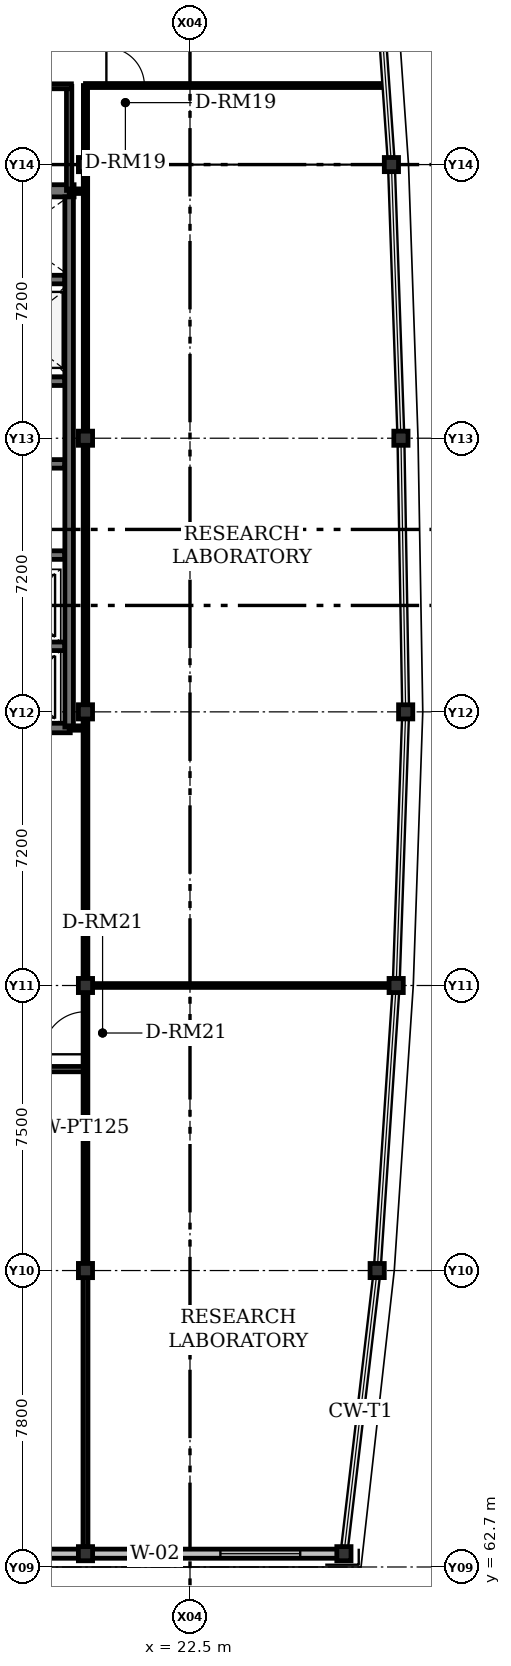
"""IFC4 building model, lengths in metres.
Left out: names, types, materials, properties, quantities, classifications, styles, units other than length and angle.
Written with IfcOpenShell. Run it as: python <this file> out.ifc"""

import sys

from ifc_helpers import new_model, si_unit, direction, frame, frame_2d, origin, origin_2d, place, context, subcontext, project, spatial, rectangle, i_section, extrude, element, fill, save


model = new_model("IFC4")
c1 = context("Model", 3, precision=1e-05, world=origin(), true_north=direction((0.0, 1.0)))
c2 = subcontext(c1, "Body", "Model", "MODEL_VIEW")
j1 = project(units=[si_unit("LENGTHUNIT", "METRE"), si_unit("PLANEANGLEUNIT", "RADIAN")], contexts=[c1])
p1 = place(None, origin())
s1 = spatial("IfcSite", under=j1, at=p1, CompositionType="ELEMENT")
p2 = place(p1, origin())
s2 = spatial("IfcBuilding", under=s1, at=p2, CompositionType="ELEMENT")
p3 = place(p2, frame((0.0, 0.0, 22.5)))
s3 = spatial("IfcBuildingStorey", under=s2, at=p3, CompositionType="ELEMENT", Elevation=22.5)
for number, where, z_axis, x_axis in (
    (1, (19.75, 63.05, 0.0), (0.0, 0.0, 1.0), (1.0, 0.0, 0.0)),
    (2, (26.55, 63.05, 0.0), (0.0, 0.0, 1.0), (1.0, 0.0, 0.0)),
    (3, (19.75, 70.5, 0.0), (0.0, 0.0, 1.0), (0.0, 1.0, 0.0)),
    (4, (27.425, 70.5, 0.0), (0.0, 0.0, 1.0), (1.0, 0.0, 0.0)),
    (5, (19.75, 78.0, 0.0), (0.0, 0.0, 1.0), (1.0, 0.0, 0.0)),
    (6, (27.925, 78.0, 0.0), (0.0, 0.0, 1.0), (1.0, 0.0, 0.0)),
    (7, (19.75, 85.2, 0.0), (0.0, 0.0, 1.0), (0.0, 1.0, 0.0)),
    (8, (28.175, 85.2, 0.0), (0.0, 0.0, 1.0), (1.0, 0.0, 0.0)),
    (9, (19.75, 92.4, 0.0), (0.0, 0.0, 1.0), (1.0, 0.0, 0.0)),
    (10, (28.05, 92.4, 0.0), (0.0, 0.0, 1.0), (1.0, 0.0, 0.0)),
    (11, (19.75, 99.6, 0.0), (0.0, 0.0, 1.0), (0.0, 1.0, 0.0)),
    (12, (27.8, 99.6, 0.0), (0.0, 0.0, 1.0), (1.0, 0.0, 0.0)),
):
    element("IfcColumn", number, at=place(p3, frame(where, z_axis=z_axis, x_axis=x_axis)), inside=s3, PredefinedType="COLUMN", context=c2, shape_type="SweptSolid", body=[
        extrude(i_section(OverallWidth=0.374, OverallDepth=0.372, WebThickness=0.016, FlangeThickness=0.026, FilletRadius=0.015, at=origin_2d()), origin(), (0.0, 0.0, 1.0), 4.2),
    ])
p4 = place(p3, frame((19.75, 63.05, 0.0), z_axis=(0.0, 0.0, 1.0), x_axis=(-1.0, 0.0, 0.0)))
e13 = element("IfcWall", 13, at=p4, inside=s3, PredefinedType="SOLIDWALL", context=c2, shape_type="SweptSolid", body=[
    extrude(rectangle(XDim=11.9, YDim=0.24, at=frame_2d((5.95, 0.0))), origin(), (0.0, 0.0, 1.0), 3.557),
])
p5 = place(p4, frame((1.15, 0.0, 0.92)))
e14 = element("IfcOpeningElement", 14, at=p5, cuts=e13, PredefinedType="OPENING", context=c2, shape_type="SweptSolid", body=[
    extrude(rectangle(XDim=2.4, YDim=1.55, at=frame_2d((1.2, 0.775))), frame((0.0, 0.12, 0.0), z_axis=(0.0, -1.0, 0.0), x_axis=(1.0, 0.0, 0.0)), (0.0, 0.0, 1.0), 0.24),
])
p6 = place(p4, frame((9.7, 0.0, 0.92)))
e15 = element("IfcOpeningElement", 15, at=p6, cuts=e13, PredefinedType="OPENING", context=c2, shape_type="SweptSolid", body=[
    extrude(rectangle(XDim=1.05, YDim=1.3, at=frame_2d((0.525, 0.65))), frame((0.0, 0.12, 0.0), z_axis=(0.0, -1.0, 0.0), x_axis=(1.0, 0.0, 0.0)), (0.0, 0.0, 1.0), 0.24),
])
p7 = place(p3, frame((26.55, 63.05, 0.0), z_axis=(0.0, 0.0, 1.0), x_axis=(-1.0, 0.0, 0.0)))
e16 = element("IfcWall", 16, at=p7, inside=s3, PredefinedType="SOLIDWALL", context=c2, shape_type="SweptSolid", body=[
    extrude(rectangle(XDim=6.8, YDim=0.24, at=frame_2d((3.4, 0.0))), origin(), (0.0, 0.0, 1.0), 3.557),
])
p8 = place(p7, frame((1.15, 0.0, 0.92)))
e17 = element("IfcOpeningElement", 17, at=p8, cuts=e16, PredefinedType="OPENING", context=c2, shape_type="SweptSolid", body=[
    extrude(rectangle(XDim=2.1, YDim=1.7, at=frame_2d((1.05, 0.85))), frame((0.0, 0.12, 0.0), z_axis=(0.0, -1.0, 0.0), x_axis=(1.0, 0.0, 0.0)), (0.0, 0.0, 1.0), 0.24),
])
p9 = place(p7, frame((4.3, 0.0, 0.92)))
e18 = element("IfcOpeningElement", 18, at=p9, cuts=e16, PredefinedType="OPENING", context=c2, shape_type="SweptSolid", body=[
    extrude(rectangle(XDim=1.35, YDim=1.4, at=frame_2d((0.675, 0.7))), frame((0.0, 0.12, 0.0), z_axis=(0.0, -1.0, 0.0), x_axis=(1.0, 0.0, 0.0)), (0.0, 0.0, 1.0), 0.24),
])
p10 = place(p3, frame((16.15, 98.91, 0.0), z_axis=(0.0, 0.0, 1.0), x_axis=(1.0, 0.0, 0.0)))
e19 = element("IfcWall", 19, at=p10, inside=s3, PredefinedType="SHEAR", context=c2, shape_type="SweptSolid", body=[
    extrude(rectangle(XDim=3.3, YDim=0.32, at=frame_2d((1.65, 0.0))), origin(), (0.0, 0.0, 1.0), 4.2),
])
p11 = place(p3, frame((16.4, 84.775, 0.0), z_axis=(0.0, 0.0, 1.0), x_axis=(1.0, 0.0, 0.0)))
e20 = element("IfcWall", 20, at=p11, inside=s3, PredefinedType="SHEAR", context=c2, shape_type="SweptSolid", body=[
    extrude(rectangle(XDim=2.95, YDim=0.25, at=frame_2d((1.475, 0.0))), origin(), (0.0, 0.0, 1.0), 4.2),
])
p12 = place(p3, frame((19.32, 84.8, 0.0), z_axis=(0.0, 0.0, 1.0), x_axis=(0.0, 1.0, 0.0)))
e21 = element("IfcWall", 21, at=p12, inside=s3, PredefinedType="SHEAR", context=c2, shape_type="SweptSolid", body=[
    extrude(rectangle(XDim=13.95, YDim=0.225, at=frame_2d((6.975, 0.0))), origin(), (0.0, 0.0, 1.0), 4.2),
])
for number, where, z_axis, x_axis in (
    (22, (16.4, 86.925, 0.0), (0.0, 0.0, 1.0), (1.0, 0.0, 0.0)),
    (23, (16.4, 89.325, 0.0), (0.0, 0.0, 1.0), (1.0, 0.0, 0.0)),
    (24, (16.4, 91.725, 0.0), (0.0, 0.0, 1.0), (1.0, 0.0, 0.0)),
    (25, (16.4, 93.9, 0.0), (0.0, 0.0, 1.0), (1.0, 0.0, 0.0)),
    (26, (16.4, 96.575, 0.0), (0.0, 0.0, 1.0), (1.0, 0.0, 0.0)),
):
    element("IfcWall", number, at=place(p3, frame(where, z_axis=z_axis, x_axis=x_axis)), inside=s3, PredefinedType="SHEAR", context=c2, shape_type="SweptSolid", body=[
        extrude(rectangle(XDim=2.8, YDim=0.225, at=frame_2d((1.4, 0.0))), origin(), (0.0, 0.0, 1.0), 4.2),
    ])
p13 = place(p3, frame((19.32, 98.92, 0.0), z_axis=(0.0, 0.0, 1.0), x_axis=(0.0, 1.0, 0.0)))
e27 = element("IfcWall", 27, at=p13, inside=s3, PredefinedType="PARTITIONING", context=c2, shape_type="SweptSolid", body=[
    extrude(rectangle(XDim=2.74, YDim=0.14, at=frame_2d((1.37, 0.0))), origin(), (0.0, 0.0, 1.0), 3.277),
])
p14 = place(p3, frame((19.38, 101.66, 0.0), z_axis=(0.0, 0.0, 1.0), x_axis=(-1.0, 0.0, 0.0)))
e28 = element("IfcWall", 28, at=p14, inside=s3, PredefinedType="PARTITIONING", context=c2, shape_type="SweptSolid", body=[
    extrude(rectangle(XDim=3.16, YDim=0.13, at=frame_2d((1.58, 0.0))), origin(), (0.0, 0.0, 1.0), 3.95),
])
p15 = place(p3, frame((19.75, 98.9, 0.0), z_axis=(0.0, 0.0, 1.0), x_axis=(-1.0, 0.0, 0.0)))
e29 = element("IfcWall", 29, at=p15, inside=s3, PredefinedType="PARTITIONING", context=c2, shape_type="SweptSolid", body=[
    extrude(rectangle(XDim=0.43, YDim=0.12, at=frame_2d((0.215, 0.0))), origin(), (0.0, 0.0, 1.0), 3.507),
])
p16 = place(p3, frame((19.32, 84.775, 0.0), z_axis=(0.0, 0.0, 1.0), x_axis=(1.0, 0.0, 0.0)))
e30 = element("IfcWall", 30, at=p16, inside=s3, PredefinedType="PARTITIONING", context=c2, shape_type="SweptSolid", body=[
    extrude(rectangle(XDim=0.43, YDim=0.115, at=frame_2d((0.215, 0.0))), origin(), (0.0, 0.0, 1.0), 3.507),
])
p17 = place(p3, frame((19.75, 78.181, 0.0), z_axis=(0.0, 0.0, 1.0), x_axis=(0.0, 1.0, 0.0)))
e31 = element("IfcWall", 31, at=p17, inside=s3, PredefinedType="PARTITIONING", context=c2, shape_type="SweptSolid", body=[
    extrude(rectangle(XDim=6.837, YDim=0.125, at=frame_2d((3.418, 0.0))), origin(), (0.0, 0.0, 1.0), 3.507),
])
p18 = place(p3, frame((19.75, 85.382, 0.0), z_axis=(0.0, 0.0, 1.0), x_axis=(0.0, 1.0, 0.0)))
e32 = element("IfcWall", 32, at=p18, inside=s3, PredefinedType="PARTITIONING", context=c2, shape_type="SweptSolid", body=[
    extrude(rectangle(XDim=6.837, YDim=0.12, at=frame_2d((3.418, 0.0))), origin(), (0.0, 0.0, 1.0), 3.507),
])
p19 = place(p3, frame((19.75, 92.581, 0.0), z_axis=(0.0, 0.0, 1.0), x_axis=(0.0, 1.0, 0.0)))
e33 = element("IfcWall", 33, at=p19, inside=s3, PredefinedType="PARTITIONING", context=c2, shape_type="SweptSolid", body=[
    extrude(rectangle(XDim=6.837, YDim=0.115, at=frame_2d((3.418, 0.0))), origin(), (0.0, 0.0, 1.0), 3.507),
])
p20 = place(p3, frame((19.75, 99.782, 0.0), z_axis=(0.0, 0.0, 1.0), x_axis=(0.0, 1.0, 0.0)))
e34 = element("IfcWall", 34, at=p20, inside=s3, PredefinedType="PARTITIONING", context=c2, shape_type="SweptSolid", body=[
    extrude(rectangle(XDim=1.898, YDim=0.11, at=frame_2d((0.949, 0.0))), origin(), (0.0, 0.0, 1.0), 3.507),
])
p21 = place(p3, frame((19.75, 101.68, 0.0), z_axis=(0.0, 0.0, 1.0), x_axis=(1.0, 0.0, 0.0)))
e35 = element("IfcWall", 35, at=p21, inside=s3, PredefinedType="PARTITIONING", context=c2, shape_type="SweptSolid", body=[
    extrude(rectangle(XDim=7.915, YDim=0.105, at=frame_2d((3.958, 0.0))), origin(), (0.0, 0.0, 1.0), 3.507),
])
p22 = place(p21, frame((0.55, 0.0, 0.0)))
e36 = element("IfcOpeningElement", 36, at=p22, cuts=e35, PredefinedType="OPENING", context=c2, shape_type="SweptSolid", body=[
    extrude(rectangle(XDim=1.0, YDim=2.25, at=frame_2d((0.5, 1.125))), frame((0.0, 0.052, 0.0), z_axis=(0.0, -1.0, 0.0), x_axis=(1.0, 0.0, 0.0)), (0.0, 0.0, 1.0), 0.105),
])
p23 = place(p3, frame((27.743, 78.0, 0.0), z_axis=(0.0, 0.0, 1.0), x_axis=(-1.0, 0.0, 0.0)))
e37 = element("IfcWall", 37, at=p23, inside=s3, PredefinedType="PARTITIONING", context=c2, shape_type="SweptSolid", body=[
    extrude(rectangle(XDim=7.811, YDim=0.1, at=frame_2d((3.906, 0.0))), origin(), (0.0, 0.0, 1.0), 3.277),
])
p24 = place(p3, frame((19.75, 75.8, 0.0), z_axis=(0.0, 0.0, 1.0), x_axis=(-1.0, 0.0, 0.0)))
e38 = element("IfcWall", 38, at=p24, inside=s3, PredefinedType="PARTITIONING", context=c2, shape_type="SweptSolid", body=[
    extrude(rectangle(XDim=14.2, YDim=0.14, at=frame_2d((7.1, 0.0))), origin(), (0.0, 0.0, 1.0), 3.507),
])
p25 = place(p24, frame((8.02, 0.0, 0.0)))
e39 = element("IfcOpeningElement", 39, at=p25, cuts=e38, PredefinedType="OPENING", context=c2, shape_type="SweptSolid", body=[
    extrude(rectangle(XDim=1.06, YDim=2.25, at=frame_2d((0.53, 1.125))), frame((0.0, 0.07, 0.0), z_axis=(0.0, -1.0, 0.0), x_axis=(1.0, 0.0, 0.0)), (0.0, 0.0, 1.0), 0.14),
])
p26 = place(p24, frame((9.93, 0.0, 0.92)))
e40 = element("IfcOpeningElement", 40, at=p26, cuts=e38, PredefinedType="OPENING", context=c2, shape_type="SweptSolid", body=[
    extrude(rectangle(XDim=0.9, YDim=1.2, at=frame_2d((0.45, 0.6))), frame((0.0, 0.07, 0.0), z_axis=(0.0, -1.0, 0.0), x_axis=(1.0, 0.0, 0.0)), (0.0, 0.0, 1.0), 0.14),
])
p27 = place(p3, frame((19.75, 63.231, 0.0), z_axis=(0.0, 0.0, 1.0), x_axis=(0.0, 1.0, 0.0)))
e41 = element("IfcWall", 41, at=p27, inside=s3, PredefinedType="PARTITIONING", context=c2, shape_type="SweptSolid", body=[
    extrude(rectangle(XDim=7.087, YDim=0.13, at=frame_2d((3.543, 0.0))), origin(), (0.0, 0.0, 1.0), 3.507),
])
p28 = place(p3, frame((19.75, 70.682, 0.0), z_axis=(0.0, 0.0, 1.0), x_axis=(0.0, 1.0, 0.0)))
e42 = element("IfcWall", 42, at=p28, inside=s3, PredefinedType="PARTITIONING", context=c2, shape_type="SweptSolid", body=[
    extrude(rectangle(XDim=7.137, YDim=0.125, at=frame_2d((3.569, 0.0))), origin(), (0.0, 0.0, 1.0), 3.507),
])
p29 = place(p28, frame((5.508, 0.0, 0.0)))
e43 = element("IfcOpeningElement", 43, at=p29, cuts=e42, PredefinedType="OPENING", context=c2, shape_type="SweptSolid", body=[
    extrude(rectangle(XDim=1.12, YDim=2.25, at=frame_2d((0.56, 1.125))), frame((0.0, 0.062, 0.0), z_axis=(0.0, -1.0, 0.0), x_axis=(1.0, 0.0, 0.0)), (0.0, 0.0, 1.0), 0.125),
])
p30 = place(p8, origin())
e44 = element("IfcWindow", 44, at=p30, inside=s3, PartitioningType="DOUBLE_PANEL_VERTICAL", PredefinedType="WINDOW", context=c2, shape_type="SweptSolid", body=[
    extrude(rectangle(XDim=2.1, YDim=1.7, at=frame_2d((1.05, 0.85))), frame((0.0, 0.03, 0.0), z_axis=(0.0, -1.0, 0.0), x_axis=(1.0, 0.0, 0.0)), (0.0, 0.0, 1.0), 0.06),
])
fill(e17, e44)
p31 = place(p9, origin())
e45 = element("IfcWindow", 45, at=p31, inside=s3, PartitioningType="SINGLE_PANEL", PredefinedType="WINDOW", context=c2, shape_type="SweptSolid", body=[
    extrude(rectangle(XDim=1.35, YDim=1.4, at=frame_2d((0.675, 0.7))), frame((0.0, 0.03, 0.0), z_axis=(0.0, -1.0, 0.0), x_axis=(1.0, 0.0, 0.0)), (0.0, 0.0, 1.0), 0.06),
])
fill(e18, e45)
p32 = place(p22, origin())
e46 = element("IfcDoor", 46, at=p32, inside=s3, OperationType="SINGLE_SWING_LEFT", PredefinedType="DOOR", context=c2, shape_type="SweptSolid", body=[
    extrude(rectangle(XDim=1.0, YDim=2.25, at=frame_2d((0.5, 1.125))), frame((0.0, 0.025, 0.0), z_axis=(0.0, -1.0, 0.0), x_axis=(1.0, 0.0, 0.0)), (0.0, 0.0, 1.0), 0.05),
])
fill(e36, e46)
p33 = place(p29, origin())
e47 = element("IfcDoor", 47, at=p33, inside=s3, OperationType="SINGLE_SWING_LEFT", PredefinedType="DOOR", context=c2, shape_type="SweptSolid", body=[
    extrude(rectangle(XDim=1.12, YDim=2.25, at=frame_2d((0.56, 1.125))), frame((0.0, 0.025, 0.0), z_axis=(0.0, -1.0, 0.0), x_axis=(1.0, 0.0, 0.0)), (0.0, 0.0, 1.0), 0.05),
])
fill(e43, e47)
save(model, sys.argv[1])
